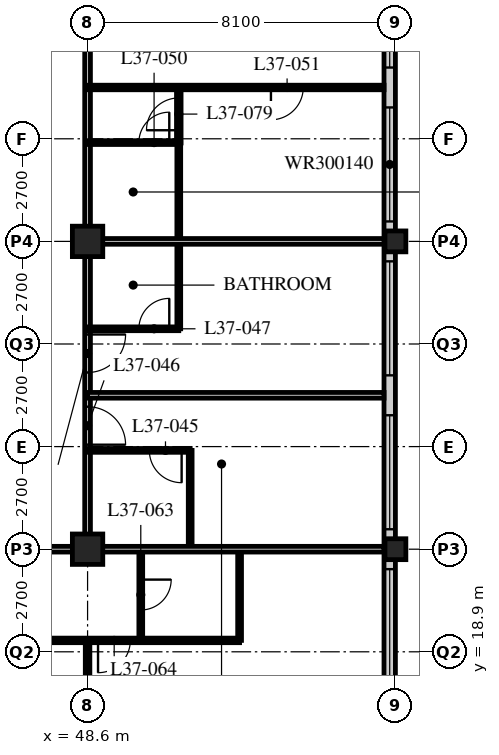
"""IFC4 building model, lengths in metres.
Left out: names, types, materials, properties, quantities, classifications, styles, units other than length and angle.
Written with IfcOpenShell. Run it as: python <this file> out.ifc"""

import sys

from ifc_helpers import new_model, si_unit, direction, frame, frame_2d, origin, origin_2d, place, context, subcontext, project, spatial, rectangle, hollow_rectangle, extrude, element, fill, save


model = new_model("IFC4")
c1 = context("Model", 3, precision=1e-05, world=origin(), true_north=direction((0.0, 1.0)))
c2 = subcontext(c1, "Body", "Model", "MODEL_VIEW")
j1 = project(units=[si_unit("LENGTHUNIT", "METRE"), si_unit("PLANEANGLEUNIT", "RADIAN")], contexts=[c1])
p1 = place(None, origin())
s1 = spatial("IfcSite", under=j1, at=p1, CompositionType="ELEMENT")
p2 = place(p1, origin())
s2 = spatial("IfcBuilding", under=s1, at=p2, CompositionType="ELEMENT")
p3 = place(p2, frame((0.0, 0.0, 144.2)))
s3 = spatial("IfcBuildingStorey", under=s2, at=p3, CompositionType="ELEMENT", Elevation=144.2)
for number, where, z_axis, x_axis in (
    (1, (48.6, 21.6, 0.0), (0.0, 0.0, 1.0), (1.0, 0.0, 0.0)),
    (2, (48.6, 29.7, 0.0), (0.0, 0.0, 1.0), (1.0, 0.0, 0.0)),
):
    element("IfcColumn", number, at=place(p3, frame(where, z_axis=z_axis, x_axis=x_axis)), inside=s3, PredefinedType="COLUMN", context=c2, shape_type="SweptSolid", body=[
        extrude(hollow_rectangle(XDim=0.8, YDim=0.8, WallThickness=0.08, at=origin_2d()), origin(), (0.0, 0.0, 1.0), 3.4),
    ])
for number, where, z_axis, x_axis in (
    (3, (56.7, 21.6, 0.0), (0.0, 0.0, 1.0), (1.0, 0.0, 0.0)),
    (4, (56.7, 29.7, 0.0), (0.0, 0.0, 1.0), (1.0, 0.0, 0.0)),
):
    element("IfcColumn", number, at=place(p3, frame(where, z_axis=z_axis, x_axis=x_axis)), inside=s3, PredefinedType="COLUMN", context=c2, shape_type="SweptSolid", body=[
        extrude(hollow_rectangle(XDim=0.55, YDim=0.55, WallThickness=0.04, at=origin_2d()), origin(), (0.0, 0.0, 1.0), 3.4),
    ])
p4 = place(p3, frame((56.55, 13.8, 0.0), z_axis=(0.0, 0.0, 1.0), x_axis=(0.0, 1.0, 0.0)))
e5 = element("IfcWall", 5, at=p4, inside=s3, PredefinedType="SOLIDWALL", context=c2, shape_type="SweptSolid", body=[
    extrude(rectangle(XDim=32.1, YDim=0.3, at=frame_2d((16.05, 0.0))), origin(), (0.0, 0.0, 1.0), 3.19),
])
p5 = place(p4, frame((0.225, 0.0, 0.9)))
e6 = element("IfcOpeningElement", 6, at=p5, cuts=e5, PredefinedType="OPENING", context=c2, shape_type="SweptSolid", body=[
    extrude(rectangle(XDim=3.0, YDim=1.4, at=frame_2d((1.5, 0.7))), frame((0.0, 0.16, 0.0), z_axis=(0.0, -1.0, 0.0), x_axis=(1.0, 0.0, 0.0)), (0.0, 0.0, 1.0), 0.32),
])
p6 = place(p4, frame((4.275, 0.0, 0.9)))
e7 = element("IfcOpeningElement", 7, at=p6, cuts=e5, PredefinedType="OPENING", context=c2, shape_type="SweptSolid", body=[
    extrude(rectangle(XDim=3.0, YDim=1.4, at=frame_2d((1.5, 0.7))), frame((0.0, 0.16, 0.0), z_axis=(0.0, -1.0, 0.0), x_axis=(1.0, 0.0, 0.0)), (0.0, 0.0, 1.0), 0.32),
])
p7 = place(p4, frame((8.325, 0.0, 0.9)))
e8 = element("IfcOpeningElement", 8, at=p7, cuts=e5, PredefinedType="OPENING", context=c2, shape_type="SweptSolid", body=[
    extrude(rectangle(XDim=3.0, YDim=1.4, at=frame_2d((1.5, 0.7))), frame((0.0, 0.16, 0.0), z_axis=(0.0, -1.0, 0.0), x_axis=(1.0, 0.0, 0.0)), (0.0, 0.0, 1.0), 0.32),
])
p8 = place(p4, frame((12.375, 0.0, 0.9)))
e9 = element("IfcOpeningElement", 9, at=p8, cuts=e5, PredefinedType="OPENING", context=c2, shape_type="SweptSolid", body=[
    extrude(rectangle(XDim=3.0, YDim=1.4, at=frame_2d((1.5, 0.7))), frame((0.0, 0.16, 0.0), z_axis=(0.0, -1.0, 0.0), x_axis=(1.0, 0.0, 0.0)), (0.0, 0.0, 1.0), 0.32),
])
p9 = place(p4, frame((16.425, 0.0, 0.9)))
e10 = element("IfcOpeningElement", 10, at=p9, cuts=e5, PredefinedType="OPENING", context=c2, shape_type="SweptSolid", body=[
    extrude(rectangle(XDim=3.0, YDim=1.4, at=frame_2d((1.5, 0.7))), frame((0.0, 0.16, 0.0), z_axis=(0.0, -1.0, 0.0), x_axis=(1.0, 0.0, 0.0)), (0.0, 0.0, 1.0), 0.32),
])
p10 = place(p4, frame((20.475, 0.0, 0.9)))
e11 = element("IfcOpeningElement", 11, at=p10, cuts=e5, PredefinedType="OPENING", context=c2, shape_type="SweptSolid", body=[
    extrude(rectangle(XDim=3.0, YDim=1.4, at=frame_2d((1.5, 0.7))), frame((0.0, 0.16, 0.0), z_axis=(0.0, -1.0, 0.0), x_axis=(1.0, 0.0, 0.0)), (0.0, 0.0, 1.0), 0.32),
])
p11 = place(p4, frame((24.525, 0.0, 0.9)))
e12 = element("IfcOpeningElement", 12, at=p11, cuts=e5, PredefinedType="OPENING", context=c2, shape_type="SweptSolid", body=[
    extrude(rectangle(XDim=3.0, YDim=1.4, at=frame_2d((1.5, 0.7))), frame((0.0, 0.16, 0.0), z_axis=(0.0, -1.0, 0.0), x_axis=(1.0, 0.0, 0.0)), (0.0, 0.0, 1.0), 0.32),
])
p12 = place(p4, frame((28.575, 0.0, 0.9)))
e13 = element("IfcOpeningElement", 13, at=p12, cuts=e5, PredefinedType="OPENING", context=c2, shape_type="SweptSolid", body=[
    extrude(rectangle(XDim=3.0, YDim=1.4, at=frame_2d((1.5, 0.7))), frame((0.0, 0.16, 0.0), z_axis=(0.0, -1.0, 0.0), x_axis=(1.0, 0.0, 0.0)), (0.0, 0.0, 1.0), 0.32),
])
p13 = place(p3, frame((12.15, 21.6, 0.0), z_axis=(0.0, 0.0, 1.0), x_axis=(1.0, 0.0, 0.0)))
e14 = element("IfcWall", 14, at=p13, inside=s3, PredefinedType="PARTITIONING", context=c2, shape_type="SweptSolid", body=[
    extrude(rectangle(XDim=36.45, YDim=0.15, at=frame_2d((18.225, 0.0))), origin(), (0.0, 0.0, 1.0), 2.42),
])
p14 = place(p13, frame((5.95, 0.0, 0.0)))
e15 = element("IfcOpeningElement", 15, at=p14, cuts=e14, PredefinedType="OPENING", context=c2, shape_type="SweptSolid", body=[
    extrude(rectangle(XDim=1.0, YDim=2.1, at=frame_2d((0.5, 1.05))), frame((0.0, 0.085, 0.0), z_axis=(0.0, -1.0, 0.0), x_axis=(1.0, 0.0, 0.0)), (0.0, 0.0, 1.0), 0.17),
])
p15 = place(p13, frame((14.05, 0.0, 0.0)))
e16 = element("IfcOpeningElement", 16, at=p15, cuts=e14, PredefinedType="OPENING", context=c2, shape_type="SweptSolid", body=[
    extrude(rectangle(XDim=1.0, YDim=2.1, at=frame_2d((0.5, 1.05))), frame((0.0, 0.085, 0.0), z_axis=(0.0, -1.0, 0.0), x_axis=(1.0, 0.0, 0.0)), (0.0, 0.0, 1.0), 0.17),
])
p16 = place(p13, frame((22.15, 0.0, 0.0)))
e17 = element("IfcOpeningElement", 17, at=p16, cuts=e14, PredefinedType="OPENING", context=c2, shape_type="SweptSolid", body=[
    extrude(rectangle(XDim=1.0, YDim=2.1, at=frame_2d((0.5, 1.05))), frame((0.0, 0.085, 0.0), z_axis=(0.0, -1.0, 0.0), x_axis=(1.0, 0.0, 0.0)), (0.0, 0.0, 1.0), 0.17),
])
p17 = place(p13, frame((30.8, 0.0, 0.0)))
e18 = element("IfcOpeningElement", 18, at=p17, cuts=e14, PredefinedType="OPENING", context=c2, shape_type="SweptSolid", body=[
    extrude(rectangle(XDim=1.0, YDim=2.1, at=frame_2d((0.5, 1.05))), frame((0.0, 0.085, 0.0), z_axis=(0.0, -1.0, 0.0), x_axis=(1.0, 0.0, 0.0)), (0.0, 0.0, 1.0), 0.17),
])
p18 = place(p13, frame((1.525, 0.0, 0.0)))
e19 = element("IfcOpeningElement", 19, at=p18, cuts=e14, PredefinedType="OPENING", context=c2, shape_type="SweptSolid", body=[
    extrude(rectangle(XDim=1.0, YDim=2.1, at=frame_2d((0.5, 1.05))), frame((0.0, 0.085, 0.0), z_axis=(0.0, -1.0, 0.0), x_axis=(1.0, 0.0, 0.0)), (0.0, 0.0, 1.0), 0.17),
])
p19 = place(p13, frame((33.925, 0.0, 0.0)))
e20 = element("IfcOpeningElement", 20, at=p19, cuts=e14, PredefinedType="OPENING", context=c2, shape_type="SweptSolid", body=[
    extrude(rectangle(XDim=1.0, YDim=2.1, at=frame_2d((0.5, 1.05))), frame((0.0, 0.085, 0.0), z_axis=(0.0, -1.0, 0.0), x_axis=(1.0, 0.0, 0.0)), (0.0, 0.0, 1.0), 0.17),
])
p20 = place(p3, frame((48.6, 21.6, 0.0), z_axis=(0.0, 0.0, 1.0), x_axis=(0.0, 1.0, 0.0)))
e21 = element("IfcWall", 21, at=p20, inside=s3, PredefinedType="PARTITIONING", context=c2, shape_type="SweptSolid", body=[
    extrude(rectangle(XDim=24.3, YDim=0.15, at=frame_2d((12.15, 0.0))), origin(), (0.0, 0.0, 1.0), 2.42),
])
p21 = place(p20, frame((2.75, 0.0, 0.0)))
e22 = element("IfcOpeningElement", 22, at=p21, cuts=e21, PredefinedType="OPENING", context=c2, shape_type="SweptSolid", body=[
    extrude(rectangle(XDim=1.0, YDim=2.1, at=frame_2d((0.5, 1.05))), frame((0.0, 0.085, 0.0), z_axis=(0.0, -1.0, 0.0), x_axis=(1.0, 0.0, 0.0)), (0.0, 0.0, 1.0), 0.17),
])
p22 = place(p20, frame((4.65, 0.0, 0.0)))
e23 = element("IfcOpeningElement", 23, at=p22, cuts=e21, PredefinedType="OPENING", context=c2, shape_type="SweptSolid", body=[
    extrude(rectangle(XDim=1.0, YDim=2.1, at=frame_2d((0.5, 1.05))), frame((0.0, 0.085, 0.0), z_axis=(0.0, -1.0, 0.0), x_axis=(1.0, 0.0, 0.0)), (0.0, 0.0, 1.0), 0.17),
])
p23 = place(p20, frame((13.675, 0.0, 0.0)))
e24 = element("IfcOpeningElement", 24, at=p23, cuts=e21, PredefinedType="OPENING", context=c2, shape_type="SweptSolid", body=[
    extrude(rectangle(XDim=1.0, YDim=2.1, at=frame_2d((0.5, 1.05))), frame((0.0, 0.085, 0.0), z_axis=(0.0, -1.0, 0.0), x_axis=(1.0, 0.0, 0.0)), (0.0, 0.0, 1.0), 0.17),
])
p24 = place(p20, frame((20.85, 0.0, 0.0)))
e25 = element("IfcOpeningElement", 25, at=p24, cuts=e21, PredefinedType="OPENING", context=c2, shape_type="SweptSolid", body=[
    extrude(rectangle(XDim=1.0, YDim=2.1, at=frame_2d((0.5, 1.05))), frame((0.0, 0.085, 0.0), z_axis=(0.0, -1.0, 0.0), x_axis=(1.0, 0.0, 0.0)), (0.0, 0.0, 1.0), 0.17),
])
p25 = place(p3, frame((51.3, 21.6, 0.0), z_axis=(0.0, 0.0, 1.0), x_axis=(0.0, 1.0, 0.0)))
e26 = element("IfcWall", 26, at=p25, inside=s3, PredefinedType="PARTITIONING", context=c2, shape_type="SweptSolid", body=[
    extrude(rectangle(XDim=2.6, YDim=0.1, at=frame_2d((1.3, 0.0))), origin(), (0.0, 0.0, 1.0), 3.19),
])
p26 = place(p3, frame((48.6, 24.2, 0.0), z_axis=(0.0, 0.0, 1.0), x_axis=(1.0, 0.0, 0.0)))
e27 = element("IfcWall", 27, at=p26, inside=s3, PredefinedType="PARTITIONING", context=c2, shape_type="SweptSolid", body=[
    extrude(rectangle(XDim=2.7, YDim=0.1, at=frame_2d((1.35, 0.0))), origin(), (0.0, 0.0, 1.0), 3.19),
])
p27 = place(p26, frame((1.625, 0.0, 0.0)))
e28 = element("IfcOpeningElement", 28, at=p27, cuts=e27, PredefinedType="OPENING", context=c2, shape_type="SweptSolid", body=[
    extrude(rectangle(XDim=0.85, YDim=2.1, at=frame_2d((0.425, 1.05))), frame((0.0, 0.06, 0.0), z_axis=(0.0, -1.0, 0.0), x_axis=(1.0, 0.0, 0.0)), (0.0, 0.0, 1.0), 0.12),
])
p28 = place(p3, frame((48.6, 25.65, 0.0), z_axis=(0.0, 0.0, 1.0), x_axis=(1.0, 0.0, 0.0)))
e29 = element("IfcWall", 29, at=p28, inside=s3, PredefinedType="PARTITIONING", context=c2, shape_type="SweptSolid", body=[
    extrude(rectangle(XDim=7.8, YDim=0.15, at=frame_2d((3.9, 0.0))), origin(), (0.0, 0.0, 1.0), 3.19),
])
p29 = place(p3, frame((51.0, 27.4, 0.0), z_axis=(0.0, 0.0, 1.0), x_axis=(0.0, 1.0, 0.0)))
e30 = element("IfcWall", 30, at=p29, inside=s3, PredefinedType="PARTITIONING", context=c2, shape_type="SweptSolid", body=[
    extrude(rectangle(XDim=4.9, YDim=0.1, at=frame_2d((2.45, 0.0))), origin(), (0.0, 0.0, 1.0), 3.19),
])
p30 = place(p3, frame((48.6, 27.4, 0.0), z_axis=(0.0, 0.0, 1.0), x_axis=(1.0, 0.0, 0.0)))
e31 = element("IfcWall", 31, at=p30, inside=s3, PredefinedType="PARTITIONING", context=c2, shape_type="SweptSolid", body=[
    extrude(rectangle(XDim=2.4, YDim=0.1, at=frame_2d((1.2, 0.0))), origin(), (0.0, 0.0, 1.0), 3.19),
])
p31 = place(p30, frame((1.35, 0.0, 0.0)))
e32 = element("IfcOpeningElement", 32, at=p31, cuts=e31, PredefinedType="OPENING", context=c2, shape_type="SweptSolid", body=[
    extrude(rectangle(XDim=0.8, YDim=2.1, at=frame_2d((0.4, 1.05))), frame((0.0, 0.06, 0.0), z_axis=(0.0, -1.0, 0.0), x_axis=(1.0, 0.0, 0.0)), (0.0, 0.0, 1.0), 0.12),
])
p32 = place(p3, frame((48.6, 29.7, 0.0), z_axis=(0.0, 0.0, 1.0), x_axis=(1.0, 0.0, 0.0)))
e33 = element("IfcWall", 33, at=p32, inside=s3, PredefinedType="PARTITIONING", context=c2, shape_type="SweptSolid", body=[
    extrude(rectangle(XDim=7.8, YDim=0.15, at=frame_2d((3.9, 0.0))), origin(), (0.0, 0.0, 1.0), 2.42),
])
p33 = place(p3, frame((48.6, 32.3, 0.0), z_axis=(0.0, 0.0, 1.0), x_axis=(1.0, 0.0, 0.0)))
e34 = element("IfcWall", 34, at=p33, inside=s3, PredefinedType="PARTITIONING", context=c2, shape_type="SweptSolid", body=[
    extrude(rectangle(XDim=2.4, YDim=0.1, at=frame_2d((1.2, 0.0))), origin(), (0.0, 0.0, 1.0), 3.19),
])
p34 = place(p33, frame((1.35, 0.0, 0.0)))
e35 = element("IfcOpeningElement", 35, at=p34, cuts=e34, PredefinedType="OPENING", context=c2, shape_type="SweptSolid", body=[
    extrude(rectangle(XDim=0.8, YDim=2.1, at=frame_2d((0.4, 1.05))), frame((0.0, 0.06, 0.0), z_axis=(0.0, -1.0, 0.0), x_axis=(1.0, 0.0, 0.0)), (0.0, 0.0, 1.0), 0.12),
])
p35 = place(p3, frame((48.6, 33.75, 0.0), z_axis=(0.0, 0.0, 1.0), x_axis=(1.0, 0.0, 0.0)))
e36 = element("IfcWall", 36, at=p35, inside=s3, PredefinedType="PARTITIONING", context=c2, shape_type="SweptSolid", body=[
    extrude(rectangle(XDim=7.8, YDim=0.12, at=frame_2d((3.9, 0.0))), origin(), (0.0, 0.0, 1.0), 3.19),
])
p36 = place(p35, frame((4.825, 0.0, 0.0)))
e37 = element("IfcOpeningElement", 37, at=p36, cuts=e36, PredefinedType="OPENING", context=c2, shape_type="SweptSolid", body=[
    extrude(rectangle(XDim=0.85, YDim=2.1, at=frame_2d((0.425, 1.05))), frame((0.0, 0.07, 0.0), z_axis=(0.0, -1.0, 0.0), x_axis=(1.0, 0.0, 0.0)), (0.0, 0.0, 1.0), 0.14),
])
p37 = place(p3, frame((44.55, 19.2, 0.0), z_axis=(0.0, 0.0, 1.0), x_axis=(1.0, 0.0, 0.0)))
e38 = element("IfcWall", 38, at=p37, inside=s3, PredefinedType="PARTITIONING", context=c2, shape_type="SweptSolid", body=[
    extrude(rectangle(XDim=8.05, YDim=0.12, at=frame_2d((4.025, 0.0))), origin(), (0.0, 0.0, 1.0), 3.19),
])
p38 = place(p37, frame((0.475, 0.0, 0.0)))
e39 = element("IfcOpeningElement", 39, at=p38, cuts=e38, PredefinedType="OPENING", context=c2, shape_type="SweptSolid", body=[
    extrude(rectangle(XDim=0.85, YDim=2.1, at=frame_2d((0.425, 1.05))), frame((0.0, 0.07, 0.0), z_axis=(0.0, -1.0, 0.0), x_axis=(1.0, 0.0, 0.0)), (0.0, 0.0, 1.0), 0.14),
])
p39 = place(p37, frame((4.325, 0.0, 0.0)))
e40 = element("IfcOpeningElement", 40, at=p39, cuts=e38, PredefinedType="OPENING", context=c2, shape_type="SweptSolid", body=[
    extrude(rectangle(XDim=0.85, YDim=2.1, at=frame_2d((0.425, 1.05))), frame((0.0, 0.07, 0.0), z_axis=(0.0, -1.0, 0.0), x_axis=(1.0, 0.0, 0.0)), (0.0, 0.0, 1.0), 0.14),
])
p40 = place(p3, frame((50.0, 21.6, 0.0), z_axis=(0.0, 0.0, 1.0), x_axis=(0.0, -1.0, 0.0)))
e41 = element("IfcWall", 41, at=p40, inside=s3, PredefinedType="PARTITIONING", context=c2, shape_type="SweptSolid", body=[
    extrude(rectangle(XDim=2.4, YDim=0.1, at=frame_2d((1.2, 0.0))), origin(), (0.0, 0.0, 1.0), 3.19),
])
p41 = place(p40, frame((0.8, 0.0, 0.0)))
e42 = element("IfcOpeningElement", 42, at=p41, cuts=e41, PredefinedType="OPENING", context=c2, shape_type="SweptSolid", body=[
    extrude(rectangle(XDim=0.8, YDim=2.1, at=frame_2d((0.4, 1.05))), frame((0.0, 0.06, 0.0), z_axis=(0.0, -1.0, 0.0), x_axis=(1.0, 0.0, 0.0)), (0.0, 0.0, 1.0), 0.12),
])
p42 = place(p3, frame((52.6, 21.6, 0.0), z_axis=(0.0, 0.0, 1.0), x_axis=(0.0, -1.0, 0.0)))
e43 = element("IfcWall", 43, at=p42, inside=s3, PredefinedType="PARTITIONING", context=c2, shape_type="SweptSolid", body=[
    extrude(rectangle(XDim=2.4, YDim=0.1, at=frame_2d((1.2, 0.0))), origin(), (0.0, 0.0, 1.0), 3.19),
])
p43 = place(p3, frame((48.6, 19.2, 0.0), z_axis=(0.0, 0.0, 1.0), x_axis=(0.0, -1.0, 0.0)))
e44 = element("IfcWall", 44, at=p43, inside=s3, PredefinedType="PARTITIONING", context=c2, shape_type="SweptSolid", body=[
    extrude(rectangle(XDim=9.45, YDim=0.12, at=frame_2d((4.725, 0.0))), origin(), (0.0, 0.0, 1.0), 2.42),
])
p44 = place(p3, frame((48.6, 21.6, 0.0), z_axis=(0.0, 0.0, 1.0), x_axis=(1.0, 0.0, 0.0)))
e45 = element("IfcWall", 45, at=p44, inside=s3, PredefinedType="PARTITIONING", context=c2, shape_type="SweptSolid", body=[
    extrude(rectangle(XDim=7.8, YDim=0.15, at=frame_2d((3.9, 0.0))), origin(), (0.0, 0.0, 1.0), 2.42),
])
p45 = place(p3, frame((51.0, 33.75, 0.0), z_axis=(0.0, 0.0, 1.0), x_axis=(0.0, -1.0, 0.0)))
e46 = element("IfcWall", 46, at=p45, inside=s3, PredefinedType="PARTITIONING", context=c2, shape_type="SweptSolid", body=[
    extrude(rectangle(XDim=1.46, YDim=0.12, at=frame_2d((0.73, 0.0))), origin(), (0.0, 0.0, 1.0), 3.19),
])
p46 = place(p45, frame((0.275, 0.0, 0.0)))
e47 = element("IfcOpeningElement", 47, at=p46, cuts=e46, PredefinedType="OPENING", context=c2, shape_type="SweptSolid", body=[
    extrude(rectangle(XDim=0.85, YDim=2.1, at=frame_2d((0.425, 1.05))), frame((0.0, 0.07, 0.0), z_axis=(0.0, -1.0, 0.0), x_axis=(1.0, 0.0, 0.0)), (0.0, 0.0, 1.0), 0.14),
])
p47 = place(p6, origin())
e48 = element("IfcWindow", 48, at=p47, inside=s3, PartitioningType="SINGLE_PANEL", PredefinedType="WINDOW", context=c2, shape_type="SweptSolid", body=[
    extrude(rectangle(XDim=3.0, YDim=1.4, at=frame_2d((1.5, 0.7))), frame((0.0, 0.03, 0.0), z_axis=(0.0, -1.0, 0.0), x_axis=(1.0, 0.0, 0.0)), (0.0, 0.0, 1.0), 0.06),
])
fill(e7, e48)
p48 = place(p7, origin())
e49 = element("IfcWindow", 49, at=p48, inside=s3, PartitioningType="SINGLE_PANEL", PredefinedType="WINDOW", context=c2, shape_type="SweptSolid", body=[
    extrude(rectangle(XDim=3.0, YDim=1.4, at=frame_2d((1.5, 0.7))), frame((0.0, 0.03, 0.0), z_axis=(0.0, -1.0, 0.0), x_axis=(1.0, 0.0, 0.0)), (0.0, 0.0, 1.0), 0.06),
])
fill(e8, e49)
p49 = place(p8, origin())
e50 = element("IfcWindow", 50, at=p49, inside=s3, PartitioningType="SINGLE_PANEL", PredefinedType="WINDOW", context=c2, shape_type="SweptSolid", body=[
    extrude(rectangle(XDim=3.0, YDim=1.4, at=frame_2d((1.5, 0.7))), frame((0.0, 0.03, 0.0), z_axis=(0.0, -1.0, 0.0), x_axis=(1.0, 0.0, 0.0)), (0.0, 0.0, 1.0), 0.06),
])
fill(e9, e50)
p50 = place(p9, origin())
e51 = element("IfcWindow", 51, at=p50, inside=s3, PartitioningType="SINGLE_PANEL", PredefinedType="WINDOW", context=c2, shape_type="SweptSolid", body=[
    extrude(rectangle(XDim=3.0, YDim=1.4, at=frame_2d((1.5, 0.7))), frame((0.0, 0.03, 0.0), z_axis=(0.0, -1.0, 0.0), x_axis=(1.0, 0.0, 0.0)), (0.0, 0.0, 1.0), 0.06),
])
fill(e10, e51)
p51 = place(p10, origin())
e52 = element("IfcWindow", 52, at=p51, inside=s3, PartitioningType="SINGLE_PANEL", PredefinedType="WINDOW", context=c2, shape_type="SweptSolid", body=[
    extrude(rectangle(XDim=3.0, YDim=1.4, at=frame_2d((1.5, 0.7))), frame((0.0, 0.03, 0.0), z_axis=(0.0, -1.0, 0.0), x_axis=(1.0, 0.0, 0.0)), (0.0, 0.0, 1.0), 0.06),
])
fill(e11, e52)
p52 = place(p27, origin())
e53 = element("IfcDoor", 53, at=p52, inside=s3, OperationType="SINGLE_SWING_LEFT", PredefinedType="DOOR", context=c2, shape_type="SweptSolid", body=[
    extrude(rectangle(XDim=0.85, YDim=2.1, at=frame_2d((0.425, 1.05))), frame((0.0, 0.025, 0.0), z_axis=(0.0, -1.0, 0.0), x_axis=(1.0, 0.0, 0.0)), (0.0, 0.0, 1.0), 0.05),
])
fill(e28, e53)
p53 = place(p21, origin())
e54 = element("IfcDoor", 54, at=p53, inside=s3, OperationType="SINGLE_SWING_RIGHT", PredefinedType="DOOR", context=c2, shape_type="SweptSolid", body=[
    extrude(rectangle(XDim=1.0, YDim=2.1, at=frame_2d((0.5, 1.05))), frame((0.0, 0.025, 0.0), z_axis=(0.0, -1.0, 0.0), x_axis=(1.0, 0.0, 0.0)), (0.0, 0.0, 1.0), 0.05),
])
fill(e22, e54)
p54 = place(p31, origin())
e55 = element("IfcDoor", 55, at=p54, inside=s3, OperationType="SINGLE_SWING_RIGHT", PredefinedType="DOOR", context=c2, shape_type="SweptSolid", body=[
    extrude(rectangle(XDim=0.8, YDim=2.1, at=frame_2d((0.4, 1.05))), frame((0.0, 0.025, 0.0), z_axis=(0.0, -1.0, 0.0), x_axis=(1.0, 0.0, 0.0)), (0.0, 0.0, 1.0), 0.05),
])
fill(e32, e55)
p55 = place(p22, origin())
e56 = element("IfcDoor", 56, at=p55, inside=s3, OperationType="SINGLE_SWING_LEFT", PredefinedType="DOOR", context=c2, shape_type="SweptSolid", body=[
    extrude(rectangle(XDim=1.0, YDim=2.1, at=frame_2d((0.5, 1.05))), frame((0.0, 0.025, 0.0), z_axis=(0.0, -1.0, 0.0), x_axis=(1.0, 0.0, 0.0)), (0.0, 0.0, 1.0), 0.05),
])
fill(e23, e56)
p56 = place(p34, origin())
e57 = element("IfcDoor", 57, at=p56, inside=s3, OperationType="SINGLE_SWING_RIGHT", PredefinedType="DOOR", context=c2, shape_type="SweptSolid", body=[
    extrude(rectangle(XDim=0.8, YDim=2.1, at=frame_2d((0.4, 1.05))), frame((0.0, 0.025, 0.0), z_axis=(0.0, -1.0, 0.0), x_axis=(1.0, 0.0, 0.0)), (0.0, 0.0, 1.0), 0.05),
])
fill(e35, e57)
p57 = place(p36, origin())
e58 = element("IfcDoor", 58, at=p57, inside=s3, OperationType="SINGLE_SWING_RIGHT", PredefinedType="DOOR", context=c2, shape_type="SweptSolid", body=[
    extrude(rectangle(XDim=0.85, YDim=2.1, at=frame_2d((0.425, 1.05))), frame((0.0, 0.025, 0.0), z_axis=(0.0, -1.0, 0.0), x_axis=(1.0, 0.0, 0.0)), (0.0, 0.0, 1.0), 0.05),
])
fill(e37, e58)
p58 = place(p41, origin())
e59 = element("IfcDoor", 59, at=p58, inside=s3, OperationType="SINGLE_SWING_LEFT", PredefinedType="DOOR", context=c2, shape_type="SweptSolid", body=[
    extrude(rectangle(XDim=0.8, YDim=2.1, at=frame_2d((0.4, 1.05))), frame((0.0, 0.025, 0.0), z_axis=(0.0, -1.0, 0.0), x_axis=(1.0, 0.0, 0.0)), (0.0, 0.0, 1.0), 0.05),
])
fill(e42, e59)
p59 = place(p39, origin())
e60 = element("IfcDoor", 60, at=p59, inside=s3, OperationType="SINGLE_SWING_RIGHT", PredefinedType="DOOR", context=c2, shape_type="SweptSolid", body=[
    extrude(rectangle(XDim=0.85, YDim=2.1, at=frame_2d((0.425, 1.05))), frame((0.0, 0.025, 0.0), z_axis=(0.0, -1.0, 0.0), x_axis=(1.0, 0.0, 0.0)), (0.0, 0.0, 1.0), 0.05),
])
fill(e40, e60)
p60 = place(p46, origin())
e61 = element("IfcDoor", 61, at=p60, inside=s3, OperationType="SINGLE_SWING_LEFT", PredefinedType="DOOR", context=c2, shape_type="SweptSolid", body=[
    extrude(rectangle(XDim=0.85, YDim=2.1, at=frame_2d((0.425, 1.05))), frame((0.0, 0.025, 0.0), z_axis=(0.0, -1.0, 0.0), x_axis=(1.0, 0.0, 0.0)), (0.0, 0.0, 1.0), 0.05),
])
fill(e47, e61)
save(model, sys.argv[1])
